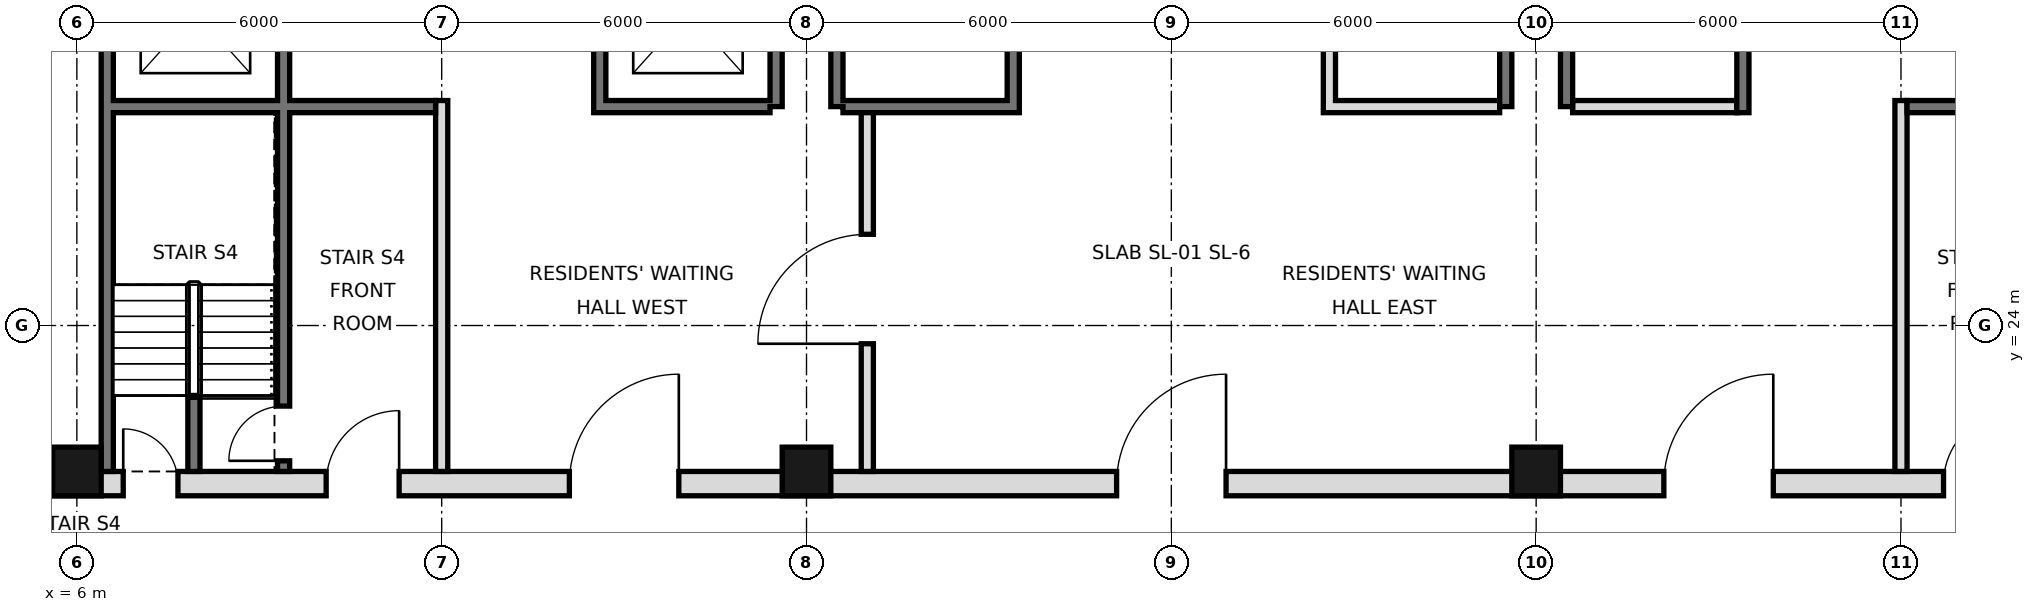
"""IFC4 building model, lengths in metres.
Left out: names, types, materials, properties, quantities, classifications, styles, units other than length and angle.
Written with IfcOpenShell. Run it as: python <this file> out.ifc"""

import sys

from ifc_helpers import new_model, si_unit, direction, frame, frame_2d, origin, origin_2d, place, context, subcontext, project, spatial, rectangle, hollow_rectangle, extrude, element, fill, save


model = new_model("IFC4")
c1 = context("Model", 3, precision=1e-05, world=origin(), true_north=direction((0.0, 1.0)))
c2 = subcontext(c1, "Body", "Model", "MODEL_VIEW")
j1 = project(units=[si_unit("LENGTHUNIT", "METRE"), si_unit("PLANEANGLEUNIT", "RADIAN")], contexts=[c1])
p1 = place(None, origin())
s1 = spatial("IfcSite", under=j1, at=p1, CompositionType="ELEMENT")
p2 = place(p1, origin())
s2 = spatial("IfcBuilding", under=s1, at=p2, CompositionType="ELEMENT")
p3 = place(p2, frame((0.0, 0.0, 138.4)))
s3 = spatial("IfcBuildingStorey", under=s2, at=p3, CompositionType="ELEMENT", Elevation=138.4)
for number, where, z_axis, x_axis in (
    (1, (6.0, 21.6, 0.0), (0.0, 0.0, 1.0), (1.0, 0.0, 0.0)),
    (2, (18.0, 21.6, 0.0), (0.0, 0.0, 1.0), (1.0, 0.0, 0.0)),
    (3, (30.0, 21.6, 0.0), (0.0, 0.0, 1.0), (1.0, 0.0, 0.0)),
):
    element("IfcColumn", number, at=place(p3, frame(where, z_axis=z_axis, x_axis=x_axis)), inside=s3, PredefinedType="COLUMN", context=c2, shape_type="SweptSolid", body=[
        extrude(hollow_rectangle(XDim=0.8, YDim=0.8, WallThickness=0.05, at=origin_2d()), origin(), (0.0, 0.0, 1.0), 5.4),
    ])
p4 = place(p3, frame((6.5, 21.6, 0.0), z_axis=(0.0, 0.0, 1.0), x_axis=(0.0, 1.0, 0.0)))
e4 = element("IfcWall", 4, at=p4, inside=s3, PredefinedType="SOLIDWALL", context=c2, shape_type="SweptSolid", body=[
    extrude(rectangle(XDim=23.5, YDim=0.2, at=frame_2d((11.75, 0.0))), origin(), (0.0, 0.0, 1.0), 5.22),
])
for number, where, z_axis, x_axis in (
    (5, (17.5, 27.6, 0.0), (0.0, 0.0, 1.0), (0.0, 1.0, 0.0)),
    (6, (18.5, 27.6, 0.0), (0.0, 0.0, 1.0), (0.0, 1.0, 0.0)),
    (7, (29.5, 27.6, 0.0), (0.0, 0.0, 1.0), (0.0, 1.0, 0.0)),
    (8, (30.5, 27.6, 0.0), (0.0, 0.0, 1.0), (0.0, 1.0, 0.0)),
):
    element("IfcWall", number, at=place(p3, frame(where, z_axis=z_axis, x_axis=x_axis)), inside=s3, PredefinedType="SOLIDWALL", context=c2, shape_type="SweptSolid", body=[
        extrude(rectangle(XDim=17.5, YDim=0.2, at=frame_2d((8.75, 0.0))), origin(), (0.0, 0.0, 1.0), 5.22),
    ])
p5 = place(p3, frame((5.6, 21.4, 0.0), z_axis=(0.0, 0.0, 1.0), x_axis=(1.0, 0.0, 0.0)))
e9 = element("IfcWall", 9, at=p5, inside=s3, PredefinedType="SOLIDWALL", context=c2, shape_type="SweptSolid", body=[
    extrude(rectangle(XDim=36.8, YDim=0.4, at=frame_2d((18.4, 0.0))), origin(), (0.0, 0.0, 1.0), 5.22),
])
p6 = place(p5, frame((8.5, 0.0, 0.0)))
e10 = element("IfcOpeningElement", 10, at=p6, cuts=e9, PredefinedType="OPENING", context=c2, shape_type="SweptSolid", body=[
    extrude(rectangle(XDim=1.8, YDim=2.1, at=frame_2d((0.9, 1.05))), frame((0.0, 0.21, 0.0), z_axis=(0.0, -1.0, 0.0), x_axis=(1.0, 0.0, 0.0)), (0.0, 0.0, 1.0), 0.42),
])
p7 = place(p5, frame((17.5, 0.0, 0.0)))
e11 = element("IfcOpeningElement", 11, at=p7, cuts=e9, PredefinedType="OPENING", context=c2, shape_type="SweptSolid", body=[
    extrude(rectangle(XDim=1.8, YDim=2.1, at=frame_2d((0.9, 1.05))), frame((0.0, 0.21, 0.0), z_axis=(0.0, -1.0, 0.0), x_axis=(1.0, 0.0, 0.0)), (0.0, 0.0, 1.0), 0.42),
])
p8 = place(p5, frame((26.5, 0.0, 0.0)))
e12 = element("IfcOpeningElement", 12, at=p8, cuts=e9, PredefinedType="OPENING", context=c2, shape_type="SweptSolid", body=[
    extrude(rectangle(XDim=1.8, YDim=2.1, at=frame_2d((0.9, 1.05))), frame((0.0, 0.21, 0.0), z_axis=(0.0, -1.0, 0.0), x_axis=(1.0, 0.0, 0.0)), (0.0, 0.0, 1.0), 0.42),
])
p9 = place(p5, frame((4.5, 0.0, 0.0)))
e13 = element("IfcOpeningElement", 13, at=p9, cuts=e9, PredefinedType="OPENING", context=c2, shape_type="SweptSolid", body=[
    extrude(rectangle(XDim=1.2, YDim=2.1, at=frame_2d((0.6, 1.05))), frame((0.0, 0.21, 0.0), z_axis=(0.0, -1.0, 0.0), x_axis=(1.0, 0.0, 0.0)), (0.0, 0.0, 1.0), 0.42),
])
p10 = place(p5, frame((31.1, 0.0, 0.0)))
e14 = element("IfcOpeningElement", 14, at=p10, cuts=e9, PredefinedType="OPENING", context=c2, shape_type="SweptSolid", body=[
    extrude(rectangle(XDim=1.2, YDim=2.1, at=frame_2d((0.6, 1.05))), frame((0.0, 0.21, 0.0), z_axis=(0.0, -1.0, 0.0), x_axis=(1.0, 0.0, 0.0)), (0.0, 0.0, 1.0), 0.42),
])
p11 = place(p5, frame((1.163, 0.0, 0.0)))
e15 = element("IfcOpeningElement", 15, at=p11, cuts=e9, PredefinedType="OPENING", context=c2, shape_type="SweptSolid", body=[
    extrude(rectangle(XDim=0.9, YDim=2.1, at=frame_2d((0.45, 1.05))), frame((0.0, 0.21, 0.0), z_axis=(0.0, -1.0, 0.0), x_axis=(1.0, 0.0, 0.0)), (0.0, 0.0, 1.0), 0.42),
])
p12 = place(p5, frame((34.738, 0.0, 0.0)))
e16 = element("IfcOpeningElement", 16, at=p12, cuts=e9, PredefinedType="OPENING", context=c2, shape_type="SweptSolid", body=[
    extrude(rectangle(XDim=0.9, YDim=2.1, at=frame_2d((0.45, 1.05))), frame((0.0, 0.21, 0.0), z_axis=(0.0, -1.0, 0.0), x_axis=(1.0, 0.0, 0.0)), (0.0, 0.0, 1.0), 0.42),
])
p13 = place(p3, frame((19.0, 21.6, 0.0), z_axis=(0.0, 0.0, 1.0), x_axis=(0.0, 1.0, 0.0)))
e17 = element("IfcWall", 17, at=p13, inside=s3, PredefinedType="PARTITIONING", context=c2, shape_type="SweptSolid", body=[
    extrude(rectangle(XDim=6.0, YDim=0.2, at=frame_2d((3.0, 0.0))), origin(), (0.0, 0.0, 1.0), 5.22),
])
p14 = place(p13, frame((2.1, 0.0, 0.0)))
e18 = element("IfcOpeningElement", 18, at=p14, cuts=e17, PredefinedType="OPENING", context=c2, shape_type="SweptSolid", body=[
    extrude(rectangle(XDim=1.8, YDim=2.1, at=frame_2d((0.9, 1.05))), frame((0.0, 0.11, 0.0), z_axis=(0.0, -1.0, 0.0), x_axis=(1.0, 0.0, 0.0)), (0.0, 0.0, 1.0), 0.22),
])
p15 = place(p3, frame((12.0, 21.6, 0.0), z_axis=(0.0, 0.0, 1.0), x_axis=(0.0, 1.0, 0.0)))
e19 = element("IfcWall", 19, at=p15, inside=s3, PredefinedType="PARTITIONING", context=c2, shape_type="SweptSolid", body=[
    extrude(rectangle(XDim=6.1, YDim=0.2, at=frame_2d((3.05, 0.0))), origin(), (0.0, 0.0, 1.0), 5.22),
])
p16 = place(p3, frame((14.6, 27.5, 0.0), z_axis=(0.0, 0.0, 1.0), x_axis=(0.0, 1.0, 0.0)))
e20 = element("IfcWall", 20, at=p16, inside=s3, PredefinedType="SOLIDWALL", context=c2, shape_type="SweptSolid", body=[
    extrude(rectangle(XDim=17.5, YDim=0.2, at=frame_2d((8.75, 0.0))), origin(), (0.0, 0.0, 1.0), 5.22),
])
p17 = place(p16, frame((1.1, 0.0, 0.0)))
e21 = element("IfcOpeningElement", 21, at=p17, cuts=e20, PredefinedType="OPENING", context=c2, shape_type="SweptSolid", body=[
    extrude(rectangle(XDim=1.1, YDim=2.1, at=frame_2d((0.55, 1.05))), frame((0.0, 0.11, 0.0), z_axis=(0.0, -1.0, 0.0), x_axis=(1.0, 0.0, 0.0)), (0.0, 0.0, 1.0), 0.22),
])
p18 = place(p16, frame((4.2, 0.0, 0.0)))
e22 = element("IfcOpeningElement", 22, at=p18, cuts=e20, PredefinedType="OPENING", context=c2, shape_type="SweptSolid", body=[
    extrude(rectangle(XDim=1.1, YDim=2.1, at=frame_2d((0.55, 1.05))), frame((0.0, 0.11, 0.0), z_axis=(0.0, -1.0, 0.0), x_axis=(1.0, 0.0, 0.0)), (0.0, 0.0, 1.0), 0.22),
])
p19 = place(p16, frame((15.4, 0.0, 0.0)))
e23 = element("IfcOpeningElement", 23, at=p19, cuts=e20, PredefinedType="OPENING", context=c2, shape_type="SweptSolid", body=[
    extrude(rectangle(XDim=1.1, YDim=2.1, at=frame_2d((0.55, 1.05))), frame((0.0, 0.11, 0.0), z_axis=(0.0, -1.0, 0.0), x_axis=(1.0, 0.0, 0.0)), (0.0, 0.0, 1.0), 0.22),
])
p20 = place(p16, frame((9.9, 0.0, 0.0)))
e24 = element("IfcOpeningElement", 24, at=p20, cuts=e20, PredefinedType="OPENING", context=c2, shape_type="SweptSolid", body=[
    extrude(rectangle(XDim=0.9, YDim=2.1, at=frame_2d((0.45, 1.05))), frame((0.0, 0.11, 0.0), z_axis=(0.0, -1.0, 0.0), x_axis=(1.0, 0.0, 0.0)), (0.0, 0.0, 1.0), 0.22),
])
p21 = place(p3, frame((21.4, 27.5, 0.0), z_axis=(0.0, 0.0, 1.0), x_axis=(0.0, 1.0, 0.0)))
e25 = element("IfcWall", 25, at=p21, inside=s3, PredefinedType="SOLIDWALL", context=c2, shape_type="SweptSolid", body=[
    extrude(rectangle(XDim=17.5, YDim=0.2, at=frame_2d((8.75, 0.0))), origin(), (0.0, 0.0, 1.0), 5.22),
])
p22 = place(p21, frame((16.2, 0.0, 0.0)))
e26 = element("IfcOpeningElement", 26, at=p22, cuts=e25, PredefinedType="OPENING", context=c2, shape_type="SweptSolid", body=[
    extrude(rectangle(XDim=1.0, YDim=2.1, at=frame_2d((0.5, 1.05))), frame((0.0, 0.11, 0.0), z_axis=(0.0, -1.0, 0.0), x_axis=(1.0, 0.0, 0.0)), (0.0, 0.0, 1.0), 0.22),
])
p23 = place(p21, frame((9.8, 0.0, 0.0)))
e27 = element("IfcOpeningElement", 27, at=p23, cuts=e25, PredefinedType="OPENING", context=c2, shape_type="SweptSolid", body=[
    extrude(rectangle(XDim=1.0, YDim=2.1, at=frame_2d((0.5, 1.05))), frame((0.0, 0.11, 0.0), z_axis=(0.0, -1.0, 0.0), x_axis=(1.0, 0.0, 0.0)), (0.0, 0.0, 1.0), 0.22),
])
p24 = place(p21, frame((7.4, 0.0, 0.0)))
e28 = element("IfcOpeningElement", 28, at=p24, cuts=e25, PredefinedType="OPENING", context=c2, shape_type="SweptSolid", body=[
    extrude(rectangle(XDim=0.9, YDim=2.1, at=frame_2d((0.45, 1.05))), frame((0.0, 0.11, 0.0), z_axis=(0.0, -1.0, 0.0), x_axis=(1.0, 0.0, 0.0)), (0.0, 0.0, 1.0), 0.22),
])
p25 = place(p3, frame((26.6, 27.5, 0.0), z_axis=(0.0, 0.0, 1.0), x_axis=(0.0, 1.0, 0.0)))
e29 = element("IfcWall", 29, at=p25, inside=s3, PredefinedType="SOLIDWALL", context=c2, shape_type="SweptSolid", body=[
    extrude(rectangle(XDim=17.5, YDim=0.2, at=frame_2d((8.75, 0.0))), origin(), (0.0, 0.0, 1.0), 5.22),
])
p26 = place(p25, frame((4.3, 0.0, 0.0)))
e30 = element("IfcOpeningElement", 30, at=p26, cuts=e29, PredefinedType="OPENING", context=c2, shape_type="SweptSolid", body=[
    extrude(rectangle(XDim=0.9, YDim=2.1, at=frame_2d((0.45, 1.05))), frame((0.0, 0.11, 0.0), z_axis=(0.0, -1.0, 0.0), x_axis=(1.0, 0.0, 0.0)), (0.0, 0.0, 1.0), 0.22),
])
p27 = place(p25, frame((10.35, 0.0, 0.0)))
e31 = element("IfcOpeningElement", 31, at=p27, cuts=e29, PredefinedType="OPENING", context=c2, shape_type="SweptSolid", body=[
    extrude(rectangle(XDim=1.0, YDim=2.1, at=frame_2d((0.5, 1.05))), frame((0.0, 0.11, 0.0), z_axis=(0.0, -1.0, 0.0), x_axis=(1.0, 0.0, 0.0)), (0.0, 0.0, 1.0), 0.22),
])
p28 = place(p3, frame((33.4, 27.5, 0.0), z_axis=(0.0, 0.0, 1.0), x_axis=(0.0, 1.0, 0.0)))
e32 = element("IfcWall", 32, at=p28, inside=s3, PredefinedType="SOLIDWALL", context=c2, shape_type="SweptSolid", body=[
    extrude(rectangle(XDim=17.5, YDim=0.2, at=frame_2d((8.75, 0.0))), origin(), (0.0, 0.0, 1.0), 5.22),
])
p29 = place(p28, frame((15.4, 0.0, 0.0)))
e33 = element("IfcOpeningElement", 33, at=p29, cuts=e32, PredefinedType="OPENING", context=c2, shape_type="SweptSolid", body=[
    extrude(rectangle(XDim=1.1, YDim=2.1, at=frame_2d((0.55, 1.05))), frame((0.0, 0.11, 0.0), z_axis=(0.0, -1.0, 0.0), x_axis=(1.0, 0.0, 0.0)), (0.0, 0.0, 1.0), 0.22),
])
p30 = place(p28, frame((2.7, 0.0, 0.0)))
e34 = element("IfcOpeningElement", 34, at=p30, cuts=e32, PredefinedType="OPENING", context=c2, shape_type="SweptSolid", body=[
    extrude(rectangle(XDim=1.0, YDim=2.1, at=frame_2d((0.5, 1.05))), frame((0.0, 0.11, 0.0), z_axis=(0.0, -1.0, 0.0), x_axis=(1.0, 0.0, 0.0)), (0.0, 0.0, 1.0), 0.22),
])
p31 = place(p28, frame((9.9, 0.0, 0.0)))
e35 = element("IfcOpeningElement", 35, at=p31, cuts=e32, PredefinedType="OPENING", context=c2, shape_type="SweptSolid", body=[
    extrude(rectangle(XDim=0.9, YDim=2.1, at=frame_2d((0.45, 1.05))), frame((0.0, 0.11, 0.0), z_axis=(0.0, -1.0, 0.0), x_axis=(1.0, 0.0, 0.0)), (0.0, 0.0, 1.0), 0.22),
])
p32 = place(p3, frame((36.0, 21.6, 0.0), z_axis=(0.0, 0.0, 1.0), x_axis=(0.0, 1.0, 0.0)))
e36 = element("IfcWall", 36, at=p32, inside=s3, PredefinedType="PARTITIONING", context=c2, shape_type="SweptSolid", body=[
    extrude(rectangle(XDim=6.1, YDim=0.2, at=frame_2d((3.05, 0.0))), origin(), (0.0, 0.0, 1.0), 5.22),
])
p33 = place(p3, frame((7.925, 21.6, 0.0), z_axis=(0.0, 0.0, 1.0), x_axis=(0.0, 1.0, 0.0)))
e37 = element("IfcWall", 37, at=p33, inside=s3, PredefinedType="SOLIDWALL", context=c2, shape_type="SweptSolid", body=[
    extrude(rectangle(XDim=1.25, YDim=0.2, at=frame_2d((0.625, 0.0))), origin(), (0.0, 0.0, 1.0), 5.22),
])
p34 = place(p3, frame((9.4, 21.6, 0.0), z_axis=(0.0, 0.0, 1.0), x_axis=(0.0, 1.0, 0.0)))
e38 = element("IfcWall", 38, at=p34, inside=s3, PredefinedType="SOLIDWALL", context=c2, shape_type="SweptSolid", body=[
    extrude(rectangle(XDim=23.4, YDim=0.2, at=frame_2d((11.7, 0.0))), origin(), (0.0, 0.0, 1.0), 5.22),
])
p35 = place(p34, frame((7.0, 0.0, 0.0)))
e39 = element("IfcOpeningElement", 39, at=p35, cuts=e38, PredefinedType="OPENING", context=c2, shape_type="SweptSolid", body=[
    extrude(rectangle(XDim=1.1, YDim=2.1, at=frame_2d((0.55, 1.05))), frame((0.0, 0.11, 0.0), z_axis=(0.0, -1.0, 0.0), x_axis=(1.0, 0.0, 0.0)), (0.0, 0.0, 1.0), 0.22),
])
p36 = place(p34, frame((10.1, 0.0, 0.0)))
e40 = element("IfcOpeningElement", 40, at=p36, cuts=e38, PredefinedType="OPENING", context=c2, shape_type="SweptSolid", body=[
    extrude(rectangle(XDim=1.1, YDim=2.1, at=frame_2d((0.55, 1.05))), frame((0.0, 0.11, 0.0), z_axis=(0.0, -1.0, 0.0), x_axis=(1.0, 0.0, 0.0)), (0.0, 0.0, 1.0), 0.22),
])
p37 = place(p34, frame((13.2, 0.0, 0.0)))
e41 = element("IfcOpeningElement", 41, at=p37, cuts=e38, PredefinedType="OPENING", context=c2, shape_type="SweptSolid", body=[
    extrude(rectangle(XDim=1.1, YDim=2.1, at=frame_2d((0.55, 1.05))), frame((0.0, 0.11, 0.0), z_axis=(0.0, -1.0, 0.0), x_axis=(1.0, 0.0, 0.0)), (0.0, 0.0, 1.0), 0.22),
])
p38 = place(p34, frame((22.1, 0.0, 0.0)))
e42 = element("IfcOpeningElement", 42, at=p38, cuts=e38, PredefinedType="OPENING", context=c2, shape_type="SweptSolid", body=[
    extrude(rectangle(XDim=1.0, YDim=2.1, at=frame_2d((0.5, 1.05))), frame((0.0, 0.11, 0.0), z_axis=(0.0, -1.0, 0.0), x_axis=(1.0, 0.0, 0.0)), (0.0, 0.0, 1.0), 0.22),
])
p39 = place(p34, frame((15.7, 0.0, 0.0)))
e43 = element("IfcOpeningElement", 43, at=p39, cuts=e38, PredefinedType="OPENING", context=c2, shape_type="SweptSolid", body=[
    extrude(rectangle(XDim=1.0, YDim=2.1, at=frame_2d((0.5, 1.05))), frame((0.0, 0.11, 0.0), z_axis=(0.0, -1.0, 0.0), x_axis=(1.0, 0.0, 0.0)), (0.0, 0.0, 1.0), 0.22),
])
p40 = place(p34, frame((0.175, 0.0, 0.0)))
e44 = element("IfcOpeningElement", 44, at=p40, cuts=e38, PredefinedType="OPENING", context=c2, shape_type="SweptSolid", body=[
    extrude(rectangle(XDim=0.9, YDim=2.1, at=frame_2d((0.45, 1.05))), frame((0.0, 0.11, 0.0), z_axis=(0.0, -1.0, 0.0), x_axis=(1.0, 0.0, 0.0)), (0.0, 0.0, 1.0), 0.22),
])
for number, where, z_axis, x_axis in (
    (45, (14.7, 27.6, 0.0), (0.0, 0.0, 1.0), (1.0, 0.0, 0.0)),
    (46, (18.6, 27.6, 0.0), (0.0, 0.0, 1.0), (1.0, 0.0, 0.0)),
    (47, (26.7, 27.6, 0.0), (0.0, 0.0, 1.0), (1.0, 0.0, 0.0)),
):
    element("IfcWall", number, at=place(p3, frame(where, z_axis=z_axis, x_axis=x_axis)), inside=s3, PredefinedType="SOLIDWALL", context=c2, shape_type="SweptSolid", body=[
        extrude(rectangle(XDim=2.7, YDim=0.2, at=frame_2d((1.35, 0.0))), origin(), (0.0, 0.0, 1.0), 5.22),
    ])
p41 = place(p3, frame((30.6, 27.6, 0.0), z_axis=(0.0, 0.0, 1.0), x_axis=(1.0, 0.0, 0.0)))
e48 = element("IfcWall", 48, at=p41, inside=s3, PredefinedType="PARTITIONING", context=c2, shape_type="SweptSolid", body=[
    extrude(rectangle(XDim=2.7, YDim=0.2, at=frame_2d((1.35, 0.0))), origin(), (0.0, 0.0, 1.0), 5.22),
])
for number, where, z_axis, x_axis in (
    (49, (36.1, 27.6, 0.0), (0.0, 0.0, 1.0), (1.0, 0.0, 0.0)),
    (50, (6.6, 27.6, 0.0), (0.0, 0.0, 1.0), (1.0, 0.0, 0.0)),
):
    element("IfcWall", number, at=place(p3, frame(where, z_axis=z_axis, x_axis=x_axis)), inside=s3, PredefinedType="SOLIDWALL", context=c2, shape_type="SweptSolid", body=[
        extrude(rectangle(XDim=5.3, YDim=0.2, at=frame_2d((2.65, 0.0))), origin(), (0.0, 0.0, 1.0), 5.22),
    ])
p42 = place(p6, frame((1.8, 0.0, 0.0), z_axis=(0.0, 0.0, 1.0), x_axis=(-1.0, 0.0, 0.0)))
e51 = element("IfcDoor", 51, at=p42, inside=s3, OperationType="SINGLE_SWING_LEFT", PredefinedType="DOOR", context=c2, shape_type="SweptSolid", body=[
    extrude(rectangle(XDim=1.8, YDim=2.1, at=frame_2d((0.9, 1.05))), frame((0.0, 0.025, 0.0), z_axis=(0.0, -1.0, 0.0), x_axis=(1.0, 0.0, 0.0)), (0.0, 0.0, 1.0), 0.05),
])
fill(e10, e51)
p43 = place(p14, origin())
e52 = element("IfcDoor", 52, at=p43, inside=s3, OperationType="SINGLE_SWING_LEFT", PredefinedType="DOOR", context=c2, shape_type="SweptSolid", body=[
    extrude(rectangle(XDim=1.8, YDim=2.1, at=frame_2d((0.9, 1.05))), frame((0.0, 0.025, 0.0), z_axis=(0.0, -1.0, 0.0), x_axis=(1.0, 0.0, 0.0)), (0.0, 0.0, 1.0), 0.05),
])
fill(e18, e52)
p44 = place(p7, frame((1.8, 0.0, 0.0), z_axis=(0.0, 0.0, 1.0), x_axis=(-1.0, 0.0, 0.0)))
e53 = element("IfcDoor", 53, at=p44, inside=s3, OperationType="SINGLE_SWING_LEFT", PredefinedType="DOOR", context=c2, shape_type="SweptSolid", body=[
    extrude(rectangle(XDim=1.8, YDim=2.1, at=frame_2d((0.9, 1.05))), frame((0.0, 0.025, 0.0), z_axis=(0.0, -1.0, 0.0), x_axis=(1.0, 0.0, 0.0)), (0.0, 0.0, 1.0), 0.05),
])
fill(e11, e53)
p45 = place(p8, frame((1.8, 0.0, 0.0), z_axis=(0.0, 0.0, 1.0), x_axis=(-1.0, 0.0, 0.0)))
e54 = element("IfcDoor", 54, at=p45, inside=s3, OperationType="SINGLE_SWING_LEFT", PredefinedType="DOOR", context=c2, shape_type="SweptSolid", body=[
    extrude(rectangle(XDim=1.8, YDim=2.1, at=frame_2d((0.9, 1.05))), frame((0.0, 0.025, 0.0), z_axis=(0.0, -1.0, 0.0), x_axis=(1.0, 0.0, 0.0)), (0.0, 0.0, 1.0), 0.05),
])
fill(e12, e54)
p46 = place(p9, frame((1.2, 0.0, 0.0), z_axis=(0.0, 0.0, 1.0), x_axis=(-1.0, 0.0, 0.0)))
e55 = element("IfcDoor", 55, at=p46, inside=s3, OperationType="SINGLE_SWING_LEFT", PredefinedType="DOOR", context=c2, shape_type="SweptSolid", body=[
    extrude(rectangle(XDim=1.2, YDim=2.1, at=frame_2d((0.6, 1.05))), frame((0.0, 0.025, 0.0), z_axis=(0.0, -1.0, 0.0), x_axis=(1.0, 0.0, 0.0)), (0.0, 0.0, 1.0), 0.05),
])
fill(e13, e55)
p47 = place(p10, frame((1.2, 0.0, 0.0), z_axis=(0.0, 0.0, 1.0), x_axis=(-1.0, 0.0, 0.0)))
e56 = element("IfcDoor", 56, at=p47, inside=s3, OperationType="SINGLE_SWING_LEFT", PredefinedType="DOOR", context=c2, shape_type="SweptSolid", body=[
    extrude(rectangle(XDim=1.2, YDim=2.1, at=frame_2d((0.6, 1.05))), frame((0.0, 0.025, 0.0), z_axis=(0.0, -1.0, 0.0), x_axis=(1.0, 0.0, 0.0)), (0.0, 0.0, 1.0), 0.05),
])
fill(e14, e56)
p48 = place(p11, origin())
e57 = element("IfcDoor", 57, at=p48, inside=s3, OperationType="SINGLE_SWING_LEFT", PredefinedType="DOOR", context=c2, shape_type="SweptSolid", body=[
    extrude(rectangle(XDim=0.9, YDim=2.1, at=frame_2d((0.45, 1.05))), frame((0.0, 0.025, 0.0), z_axis=(0.0, -1.0, 0.0), x_axis=(1.0, 0.0, 0.0)), (0.0, 0.0, 1.0), 0.05),
])
fill(e15, e57)
p49 = place(p40, origin())
e58 = element("IfcDoor", 58, at=p49, inside=s3, OperationType="SINGLE_SWING_LEFT", PredefinedType="DOOR", context=c2, shape_type="SweptSolid", body=[
    extrude(rectangle(XDim=0.9, YDim=2.1, at=frame_2d((0.45, 1.05))), frame((0.0, 0.025, 0.0), z_axis=(0.0, -1.0, 0.0), x_axis=(1.0, 0.0, 0.0)), (0.0, 0.0, 1.0), 0.05),
])
fill(e44, e58)
save(model, sys.argv[1])
